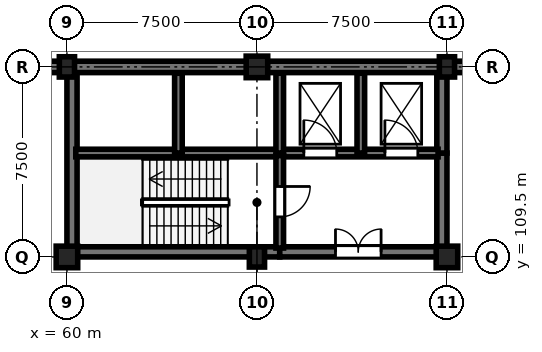
"""IFC4 building model, lengths in metres.
Left out: names, types, materials, properties, quantities, classifications, styles, units other than length and angle.
Written with IfcOpenShell. Run it as: python <this file> out.ifc"""

import sys

from ifc_helpers import new_model, si_unit, direction, frame, frame_2d, origin, origin_2d, place, context, subcontext, project, spatial, rectangle, extrude, element, fill, save


model = new_model("IFC4")
c1 = context("Model", 3, precision=1e-05, world=origin(), true_north=direction((0.0, 1.0)))
c2 = subcontext(c1, "Body", "Model", "MODEL_VIEW")
j1 = project(units=[si_unit("LENGTHUNIT", "METRE"), si_unit("PLANEANGLEUNIT", "RADIAN")], contexts=[c1])
p1 = place(None, origin())
s1 = spatial("IfcSite", under=j1, at=p1, CompositionType="ELEMENT")
p2 = place(p1, origin())
s2 = spatial("IfcBuilding", under=s1, at=p2, CompositionType="ELEMENT")
p3 = place(p2, frame((0.0, 0.0, -4.5)))
s3 = spatial("IfcBuildingStorey", under=s2, at=p3, CompositionType="ELEMENT", Elevation=-4.5)
p4 = place(p3, frame((60.0, 109.5, 0.0), z_axis=(0.0, 0.0, 1.0), x_axis=(1.0, 0.0, 0.0)))
e1 = element("IfcColumn", 1, at=p4, inside=s3, PredefinedType="COLUMN", context=c2, shape_type="SweptSolid", body=[
    extrude(rectangle(XDim=0.85, YDim=0.85, at=origin_2d()), origin(), (0.0, 0.0, 1.0), 4.5),
])
for number, where, z_axis, x_axis in (
    (2, (60.0, 117.0, 0.0), (0.0, 0.0, 1.0), (1.0, 0.0, 0.0)),
    (3, (67.5, 109.5, 0.0), (0.0, 0.0, 1.0), (1.0, 0.0, 0.0)),
):
    element("IfcColumn", number, at=place(p3, frame(where, z_axis=z_axis, x_axis=x_axis)), inside=s3, PredefinedType="COLUMN", context=c2, shape_type="SweptSolid", body=[
        extrude(rectangle(XDim=0.6, YDim=0.8, at=origin_2d()), origin(), (0.0, 0.0, 1.0), 4.5),
    ])
for number, where, z_axis, x_axis in (
    (4, (67.5, 117.0, 0.0), (0.0, 0.0, 1.0), (1.0, 0.0, 0.0)),
    (5, (75.0, 109.5, 0.0), (0.0, 0.0, 1.0), (1.0, 0.0, 0.0)),
):
    element("IfcColumn", number, at=place(p3, frame(where, z_axis=z_axis, x_axis=x_axis)), inside=s3, PredefinedType="COLUMN", context=c2, shape_type="SweptSolid", body=[
        extrude(rectangle(XDim=0.85, YDim=0.85, at=origin_2d()), origin(), (0.0, 0.0, 1.0), 4.5),
    ])
p5 = place(p3, frame((75.0, 117.0, 0.0), z_axis=(0.0, 0.0, 1.0), x_axis=(1.0, 0.0, 0.0)))
e6 = element("IfcColumn", 6, at=p5, inside=s3, PredefinedType="COLUMN", context=c2, shape_type="SweptSolid", body=[
    extrude(rectangle(XDim=0.6, YDim=0.8, at=origin_2d()), origin(), (0.0, 0.0, 1.0), 4.5),
])
for number, where, z_axis, x_axis in (
    (7, (52.5, 117.0, 0.0), (0.0, 0.0, 1.0), (1.0, 0.0, 0.0)),
    (8, (60.0, 117.0, 0.0), (0.0, 0.0, 1.0), (1.0, 0.0, 0.0)),
    (9, (67.5, 117.0, 0.0), (0.0, 0.0, 1.0), (1.0, 0.0, 0.0)),
    (10, (75.0, 117.0, 0.0), (0.0, 0.0, 1.0), (1.0, 0.0, 0.0)),
):
    element("IfcWall", number, at=place(p3, frame(where, z_axis=z_axis, x_axis=x_axis)), inside=s3, PredefinedType="SOLIDWALL", context=c2, shape_type="SweptSolid", body=[
        extrude(rectangle(XDim=7.5, YDim=0.45, at=frame_2d((3.75, 0.0))), origin(), (0.0, 0.0, 1.0), 4.14),
    ])
p6 = place(p3, frame((60.35, 109.7, 0.0), z_axis=(0.0, 0.0, 1.0), x_axis=(1.0, 0.0, 0.0)))
e11 = element("IfcWall", 11, at=p6, inside=s3, PredefinedType="SHEAR", context=c2, shape_type="SweptSolid", body=[
    extrude(rectangle(XDim=8.05, YDim=0.4, at=frame_2d((4.025, 0.0))), origin(), (0.0, 0.0, 1.0), 4.14),
])
p7 = place(p3, frame((68.4, 109.7, 0.0), z_axis=(0.0, 0.0, 1.0), x_axis=(1.0, 0.0, 0.0)))
e12 = element("IfcWall", 12, at=p7, inside=s3, PredefinedType="SHEAR", context=c2, shape_type="SweptSolid", body=[
    extrude(rectangle(XDim=6.25, YDim=0.4, at=frame_2d((3.125, 0.0))), origin(), (0.0, 0.0, 1.0), 4.14),
])
p8 = place(p7, frame((2.2, 0.0, 0.0)))
e13 = element("IfcOpeningElement", 13, at=p8, cuts=e12, PredefinedType="OPENING", context=c2, shape_type="SweptSolid", body=[
    extrude(rectangle(XDim=1.8, YDim=2.25, at=frame_2d((0.9, 1.125))), frame((0.0, 0.21, 0.0), z_axis=(0.0, -1.0, 0.0), x_axis=(1.0, 0.0, 0.0)), (0.0, 0.0, 1.0), 0.42),
])
p9 = place(p3, frame((60.2, 109.85, 0.0), z_axis=(0.0, 0.0, 1.0), x_axis=(0.0, 1.0, 0.0)))
e14 = element("IfcWall", 14, at=p9, inside=s3, PredefinedType="SHEAR", context=c2, shape_type="SweptSolid", body=[
    extrude(rectangle(XDim=6.8, YDim=0.4, at=frame_2d((3.4, 0.0))), origin(), (0.0, 0.0, 1.0), 4.14),
])
p10 = place(p3, frame((74.8, 109.85, 0.0), z_axis=(0.0, 0.0, 1.0), x_axis=(0.0, 1.0, 0.0)))
e15 = element("IfcWall", 15, at=p10, inside=s3, PredefinedType="SHEAR", context=c2, shape_type="SweptSolid", body=[
    extrude(rectangle(XDim=3.75, YDim=0.4, at=frame_2d((1.875, 0.0))), origin(), (0.0, 0.0, 1.0), 4.14),
])
p11 = place(p3, frame((74.8, 113.6, 0.0), z_axis=(0.0, 0.0, 1.0), x_axis=(0.0, 1.0, 0.0)))
e16 = element("IfcWall", 16, at=p11, inside=s3, PredefinedType="SHEAR", context=c2, shape_type="SweptSolid", body=[
    extrude(rectangle(XDim=3.05, YDim=0.4, at=frame_2d((1.525, 0.0))), origin(), (0.0, 0.0, 1.0), 4.14),
])
p12 = place(p3, frame((60.35, 113.6, 0.0), z_axis=(0.0, 0.0, 1.0), x_axis=(1.0, 0.0, 0.0)))
e17 = element("IfcWall", 17, at=p12, inside=s3, PredefinedType="SHEAR", context=c2, shape_type="SweptSolid", body=[
    extrude(rectangle(XDim=8.05, YDim=0.3, at=frame_2d((4.025, 0.0))), origin(), (0.0, 0.0, 1.0), 4.14),
])
p13 = place(p3, frame((68.4, 113.6, 0.0), z_axis=(0.0, 0.0, 1.0), x_axis=(1.0, 0.0, 0.0)))
e18 = element("IfcWall", 18, at=p13, inside=s3, PredefinedType="SHEAR", context=c2, shape_type="SweptSolid", body=[
    extrude(rectangle(XDim=6.25, YDim=0.3, at=frame_2d((3.125, 0.0))), origin(), (0.0, 0.0, 1.0), 4.14),
])
p14 = place(p13, frame((0.95, 0.0, 0.0)))
e19 = element("IfcOpeningElement", 19, at=p14, cuts=e18, PredefinedType="OPENING", context=c2, shape_type="SweptSolid", body=[
    extrude(rectangle(XDim=1.3, YDim=2.2, at=frame_2d((0.65, 1.1))), frame((0.0, 0.16, 0.0), z_axis=(0.0, -1.0, 0.0), x_axis=(1.0, 0.0, 0.0)), (0.0, 0.0, 1.0), 0.32),
])
p15 = place(p13, frame((4.15, 0.0, 0.0)))
e20 = element("IfcOpeningElement", 20, at=p15, cuts=e18, PredefinedType="OPENING", context=c2, shape_type="SweptSolid", body=[
    extrude(rectangle(XDim=1.3, YDim=2.2, at=frame_2d((0.65, 1.1))), frame((0.0, 0.16, 0.0), z_axis=(0.0, -1.0, 0.0), x_axis=(1.0, 0.0, 0.0)), (0.0, 0.0, 1.0), 0.32),
])
p16 = place(p3, frame((68.4, 113.5, 0.0), z_axis=(0.0, 0.0, 1.0), x_axis=(0.0, -1.0, 0.0)))
e21 = element("IfcWall", 21, at=p16, inside=s3, PredefinedType="SHEAR", context=c2, shape_type="SweptSolid", body=[
    extrude(rectangle(XDim=3.65, YDim=0.3, at=frame_2d((1.825, 0.0))), origin(), (0.0, 0.0, 1.0), 4.14),
])
p17 = place(p16, frame((1.22, 0.0, 0.0)))
e22 = element("IfcOpeningElement", 22, at=p17, cuts=e21, PredefinedType="OPENING", context=c2, shape_type="SweptSolid", body=[
    extrude(rectangle(XDim=1.2, YDim=2.25, at=frame_2d((0.6, 1.125))), frame((0.0, 0.16, 0.0), z_axis=(0.0, -1.0, 0.0), x_axis=(1.0, 0.0, 0.0)), (0.0, 0.0, 1.0), 0.32),
])
for number, where, z_axis, x_axis in (
    (23, (64.4, 113.6, 0.0), (0.0, 0.0, 1.0), (0.0, 1.0, 0.0)),
    (24, (68.4, 113.6, 0.0), (0.0, 0.0, 1.0), (0.0, 1.0, 0.0)),
    (25, (71.6, 113.6, 0.0), (0.0, 0.0, 1.0), (0.0, 1.0, 0.0)),
):
    element("IfcWall", number, at=place(p3, frame(where, z_axis=z_axis, x_axis=x_axis)), inside=s3, PredefinedType="SHEAR", context=c2, shape_type="SweptSolid", body=[
        extrude(rectangle(XDim=3.15, YDim=0.3, at=frame_2d((1.575, 0.0))), origin(), (0.0, 0.0, 1.0), 4.14),
    ])
p18 = place(p8, origin())
e26 = element("IfcDoor", 26, at=p18, inside=s3, OperationType="DOUBLE_DOOR_SINGLE_SWING", PredefinedType="DOOR", context=c2, shape_type="SweptSolid", body=[
    extrude(rectangle(XDim=1.8, YDim=2.25, at=frame_2d((0.9, 1.125))), frame((0.0, 0.025, 0.0), z_axis=(0.0, -1.0, 0.0), x_axis=(1.0, 0.0, 0.0)), (0.0, 0.0, 1.0), 0.05),
])
fill(e13, e26)
p19 = place(p14, origin())
e27 = element("IfcDoor", 27, at=p19, inside=s3, OperationType="DOUBLE_DOOR_SLIDING", PredefinedType="DOOR", context=c2, shape_type="SweptSolid", body=[
    extrude(rectangle(XDim=1.3, YDim=2.2, at=frame_2d((0.65, 1.1))), frame((0.0, 0.025, 0.0), z_axis=(0.0, -1.0, 0.0), x_axis=(1.0, 0.0, 0.0)), (0.0, 0.0, 1.0), 0.05),
])
fill(e19, e27)
p20 = place(p15, origin())
e28 = element("IfcDoor", 28, at=p20, inside=s3, OperationType="DOUBLE_DOOR_SLIDING", PredefinedType="DOOR", context=c2, shape_type="SweptSolid", body=[
    extrude(rectangle(XDim=1.3, YDim=2.2, at=frame_2d((0.65, 1.1))), frame((0.0, 0.025, 0.0), z_axis=(0.0, -1.0, 0.0), x_axis=(1.0, 0.0, 0.0)), (0.0, 0.0, 1.0), 0.05),
])
fill(e20, e28)
p21 = place(p17, origin())
e29 = element("IfcDoor", 29, at=p21, inside=s3, OperationType="SINGLE_SWING_LEFT", PredefinedType="DOOR", context=c2, shape_type="SweptSolid", body=[
    extrude(rectangle(XDim=1.2, YDim=2.25, at=frame_2d((0.6, 1.125))), frame((0.0, 0.025, 0.0), z_axis=(0.0, -1.0, 0.0), x_axis=(1.0, 0.0, 0.0)), (0.0, 0.0, 1.0), 0.05),
])
fill(e22, e29)
save(model, sys.argv[1])
